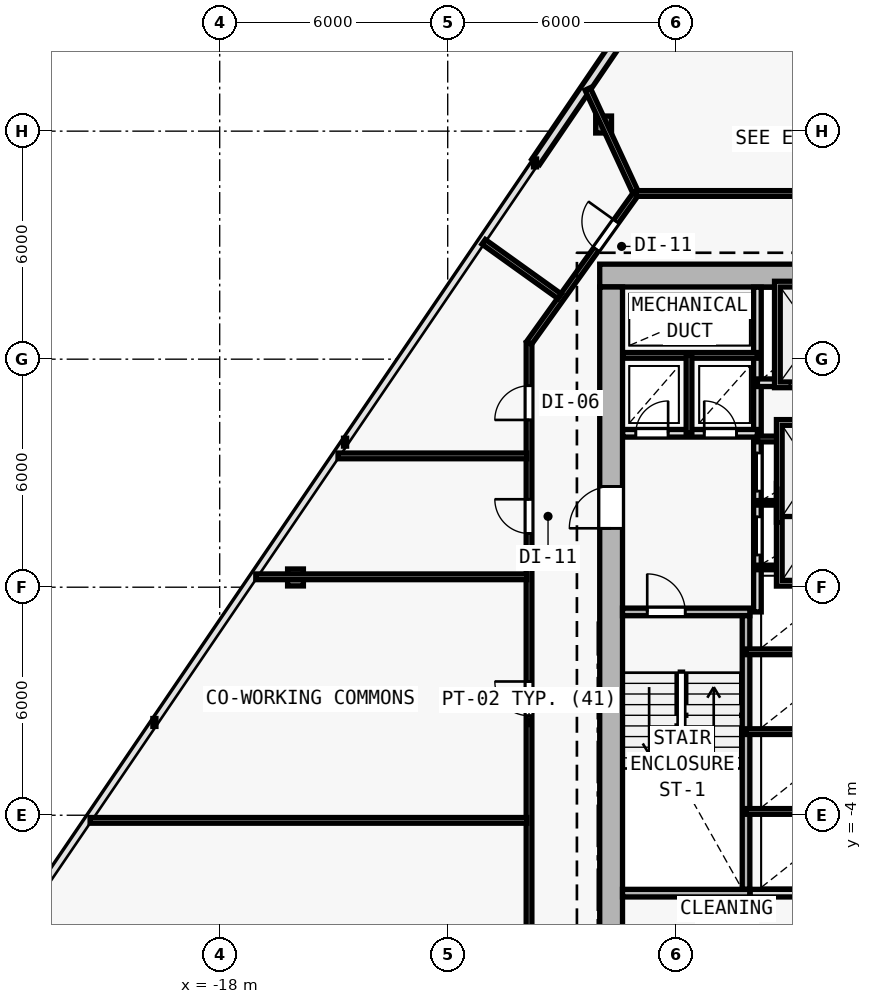
"""IFC4 building model, lengths in metres.
Left out: names, types, materials, properties, quantities, classifications, styles, units other than length and angle.
Written with IfcOpenShell. Run it as: python <this file> out.ifc"""

import sys

from ifc_helpers import new_model, si_unit, direction, frame, frame_2d, origin, origin_2d, place, context, subcontext, project, spatial, rectangle, i_section, extrude, element, fill, save


model = new_model("IFC4")
c1 = context("Model", 3, precision=1e-05, world=origin(), true_north=direction((0.0, 1.0)))
c2 = subcontext(c1, "Body", "Model", "MODEL_VIEW")
j1 = project(units=[si_unit("LENGTHUNIT", "METRE"), si_unit("PLANEANGLEUNIT", "RADIAN")], contexts=[c1])
p1 = place(None, origin())
s1 = spatial("IfcSite", under=j1, at=p1, CompositionType="ELEMENT")
p2 = place(p1, origin())
s2 = spatial("IfcBuilding", under=s1, at=p2, CompositionType="ELEMENT")
p3 = place(p2, frame((0.0, 0.0, 37.2)))
s3 = spatial("IfcBuildingStorey", under=s2, at=p3, CompositionType="ELEMENT", Elevation=37.2)
for number, where, z_axis, x_axis in (
    (1, (-7.7, 10.2, 0.0), (0.0, 0.0, 1.0), (1.0, 0.0, 0.0)),
    (2, (-7.7, 2.0, 0.0), (0.0, 0.0, 1.0), (1.0, 0.0, 0.0)),
):
    element("IfcColumn", number, at=place(p3, frame(where, z_axis=z_axis, x_axis=x_axis)), inside=s3, PredefinedType="COLUMN", context=c2, shape_type="SweptSolid", body=[
        extrude(i_section(OverallWidth=0.416, OverallDepth=0.446, WebThickness=0.025, FlangeThickness=0.04, FilletRadius=0.015, at=origin_2d()), origin(), (0.0, 0.0, 1.0), 3.6),
    ])
p4 = place(p3, frame((-7.898, 14.174, 0.006), z_axis=(0.008775143007, -0.002584925847, 0.999958156636), x_axis=(0.282568886397, 0.959247009086, 0.0)))
e3 = element("IfcColumn", 3, at=p4, inside=s3, PredefinedType="COLUMN", context=c2, shape_type="SweptSolid", body=[
    extrude(i_section(OverallWidth=0.416, OverallDepth=0.446, WebThickness=0.025, FlangeThickness=0.04, FilletRadius=0.015, at=origin_2d()), origin(), (0.0, 0.0, 1.0), 3.589),
])
p5 = place(p3, frame((-16.005, 2.256, 0.006), z_axis=(0.017003572908, 0.009522000828, 0.999810086971), x_axis=(-0.488603368932, 0.87250601595, 0.0)))
e4 = element("IfcColumn", 4, at=p5, inside=s3, PredefinedType="COLUMN", context=c2, shape_type="SweptSolid", body=[
    extrude(i_section(OverallWidth=0.416, OverallDepth=0.446, WebThickness=0.025, FlangeThickness=0.04, FilletRadius=0.015, at=origin_2d()), origin(), (0.0, 0.0, 1.0), 3.59),
])
p6 = place(p3, frame((-9.684, 13.191, 0.0), z_axis=(0.0, 0.0, 1.0), x_axis=(0.562473549685, 0.826815279192, 0.0)))
e5 = element("IfcWall", 5, at=p6, inside=s3, PredefinedType="SOLIDWALL", context=c2, shape_type="SweptSolid", body=[
    extrude(rectangle(XDim=12.536, YDim=0.25, at=frame_2d((6.268, 0.0))), origin(), (0.0, 0.0, 1.0), 3.35),
])
p7 = place(p6, frame((5.668, 0.0, 0.62)))
e6 = element("IfcOpeningElement", 6, at=p7, cuts=e5, PredefinedType="OPENING", context=c2, shape_type="SweptSolid", body=[
    extrude(rectangle(XDim=1.2, YDim=1.8, at=frame_2d((0.6, 0.9))), frame((0.0, 0.135, 0.0), z_axis=(0.0, -1.0, 0.0), x_axis=(1.0, 0.0, 0.0)), (0.0, 0.0, 1.0), 0.27),
])
p8 = place(p3, frame((8.0, 10.2, 0.0), z_axis=(0.0, 0.0, 1.0), x_axis=(-1.0, 0.0, 0.0)))
e7 = element("IfcWall", 7, at=p8, inside=s3, PredefinedType="SHEAR", context=c2, shape_type="SweptSolid", body=[
    extrude(rectangle(XDim=16.0, YDim=0.6, at=frame_2d((8.0, 0.0))), origin(), (0.0, 0.0, 1.0), 3.35),
])
p9 = place(p8, frame((4.45, 0.0, 0.0)))
e8 = element("IfcOpeningElement", 8, at=p9, cuts=e7, PredefinedType="OPENING", context=c2, shape_type="SweptSolid", body=[
    extrude(rectangle(XDim=1.1, YDim=2.15, at=frame_2d((0.55, 1.075))), frame((0.0, 0.31, 0.0), z_axis=(0.0, -1.0, 0.0), x_axis=(1.0, 0.0, 0.0)), (0.0, 0.0, 1.0), 0.62),
])
p10 = place(p3, frame((-7.7, -9.1, 0.0), z_axis=(0.0, 0.0, 1.0), x_axis=(0.0, 1.0, 0.0)))
e9 = element("IfcWall", 9, at=p10, inside=s3, PredefinedType="SHEAR", context=c2, shape_type="SweptSolid", body=[
    extrude(rectangle(XDim=19.0, YDim=0.6, at=frame_2d((9.5, 0.0))), origin(), (0.0, 0.0, 1.0), 3.35),
])
p11 = place(p10, frame((12.65, 0.0, 0.0)))
e10 = element("IfcOpeningElement", 10, at=p11, cuts=e9, PredefinedType="OPENING", context=c2, shape_type="SweptSolid", body=[
    extrude(rectangle(XDim=1.1, YDim=2.15, at=frame_2d((0.55, 1.075))), frame((0.0, 0.31, 0.0), z_axis=(0.0, -1.0, 0.0), x_axis=(1.0, 0.0, 0.0)), (0.0, 0.0, 1.0), 0.62),
])
p12 = place(p3, frame((-7.4, 1.35, 0.0), z_axis=(0.0, 0.0, 1.0), x_axis=(1.0, 0.0, 0.0)))
e11 = element("IfcWall", 11, at=p12, inside=s3, PredefinedType="SOLIDWALL", context=c2, shape_type="SweptSolid", body=[
    extrude(rectangle(XDim=3.35, YDim=0.2, at=frame_2d((1.675, 0.0))), origin(), (0.0, 0.0, 1.0), 3.35),
])
p13 = place(p12, frame((0.65, 0.0, 0.0)))
e12 = element("IfcOpeningElement", 12, at=p13, cuts=e11, PredefinedType="OPENING", context=c2, shape_type="SweptSolid", body=[
    extrude(rectangle(XDim=1.0, YDim=2.15, at=frame_2d((0.5, 1.075))), frame((0.0, 0.11, 0.0), z_axis=(0.0, -1.0, 0.0), x_axis=(1.0, 0.0, 0.0)), (0.0, 0.0, 1.0), 0.22),
])
p14 = place(p3, frame((-4.15, -5.95, 0.0), z_axis=(0.0, 0.0, 1.0), x_axis=(0.0, 1.0, 0.0)))
e13 = element("IfcWall", 13, at=p14, inside=s3, PredefinedType="SOLIDWALL", context=c2, shape_type="SweptSolid", body=[
    extrude(rectangle(XDim=7.2, YDim=0.2, at=frame_2d((3.6, 0.0))), origin(), (0.0, 0.0, 1.0), 3.35),
])
p15 = place(p3, frame((-3.85, 1.35, 0.0), z_axis=(0.0, 0.0, 1.0), x_axis=(0.0, 1.0, 0.0)))
e14 = element("IfcWall", 14, at=p15, inside=s3, PredefinedType="SOLIDWALL", context=c2, shape_type="SweptSolid", body=[
    extrude(rectangle(XDim=8.545, YDim=0.2, at=frame_2d((4.272, 0.0))), origin(), (0.0, 0.0, 1.0), 3.35),
])
p16 = place(p15, frame((1.5, 0.0, 0.0)))
e15 = element("IfcOpeningElement", 15, at=p16, cuts=e14, PredefinedType="OPENING", context=c2, shape_type="SweptSolid", body=[
    extrude(rectangle(XDim=1.0, YDim=2.15, at=frame_2d((0.5, 1.075))), frame((0.0, 0.11, 0.0), z_axis=(0.0, -1.0, 0.0), x_axis=(1.0, 0.0, 0.0)), (0.0, 0.0, 1.0), 0.22),
])
p17 = place(p15, frame((3.18, 0.0, 0.0)))
e16 = element("IfcOpeningElement", 16, at=p17, cuts=e14, PredefinedType="OPENING", context=c2, shape_type="SweptSolid", body=[
    extrude(rectangle(XDim=1.0, YDim=2.15, at=frame_2d((0.5, 1.075))), frame((0.0, 0.11, 0.0), z_axis=(0.0, -1.0, 0.0), x_axis=(1.0, 0.0, 0.0)), (0.0, 0.0, 1.0), 0.22),
])
p18 = place(p3, frame((-7.395, 6.05, 0.0), z_axis=(0.0, 0.0, 1.0), x_axis=(1.0, 0.0, 0.0)))
e17 = element("IfcWall", 17, at=p18, inside=s3, PredefinedType="SOLIDWALL", context=c2, shape_type="SweptSolid", body=[
    extrude(rectangle(XDim=3.545, YDim=0.2, at=frame_2d((1.772, 0.0))), origin(), (0.0, 0.0, 1.0), 3.35),
])
p19 = place(p18, frame((0.345, 0.0, 0.0)))
e18 = element("IfcOpeningElement", 18, at=p19, cuts=e17, PredefinedType="OPENING", context=c2, shape_type="SweptSolid", body=[
    extrude(rectangle(XDim=0.85, YDim=2.1, at=frame_2d((0.425, 1.05))), frame((0.0, 0.11, 0.0), z_axis=(0.0, -1.0, 0.0), x_axis=(1.0, 0.0, 0.0)), (0.0, 0.0, 1.0), 0.22),
])
p20 = place(p18, frame((2.145, 0.0, 0.0)))
e19 = element("IfcOpeningElement", 19, at=p20, cuts=e17, PredefinedType="OPENING", context=c2, shape_type="SweptSolid", body=[
    extrude(rectangle(XDim=0.85, YDim=2.1, at=frame_2d((0.425, 1.05))), frame((0.0, 0.11, 0.0), z_axis=(0.0, -1.0, 0.0), x_axis=(1.0, 0.0, 0.0)), (0.0, 0.0, 1.0), 0.22),
])
p21 = place(p3, frame((-7.395, 8.1, 0.0), z_axis=(0.0, 0.0, 1.0), x_axis=(1.0, 0.0, 0.0)))
e20 = element("IfcWall", 20, at=p21, inside=s3, PredefinedType="PARTITIONING", context=c2, shape_type="SweptSolid", body=[
    extrude(rectangle(XDim=3.545, YDim=0.15, at=frame_2d((1.772, 0.0))), origin(), (0.0, 0.0, 1.0), 3.35),
])
p22 = place(p3, frame((-5.65, 6.05, 0.0), z_axis=(0.0, 0.0, 1.0), x_axis=(0.0, 1.0, 0.0)))
e21 = element("IfcWall", 21, at=p22, inside=s3, PredefinedType="PARTITIONING", context=c2, shape_type="SweptSolid", body=[
    extrude(rectangle(XDim=2.05, YDim=0.15, at=frame_2d((1.025, 0.0))), origin(), (0.0, 0.0, 1.0), 3.35),
])
for number, where, z_axis, x_axis in (
    (22, (-3.85, 2.52, 0.0), (0.0, 0.0, 1.0), (1.0, 0.0, 0.0)),
    (23, (-3.85, 4.22, 0.0), (0.0, 0.0, 1.0), (1.0, 0.0, 0.0)),
):
    element("IfcWall", number, at=place(p3, frame(where, z_axis=z_axis, x_axis=x_axis)), inside=s3, PredefinedType="PARTITIONING", context=c2, shape_type="SweptSolid", body=[
        extrude(rectangle(XDim=2.9, YDim=0.12, at=frame_2d((1.45, 0.0))), origin(), (0.0, 0.0, 1.0), 3.35),
    ])
p23 = place(p3, frame((-3.85, 5.9, 0.0), z_axis=(0.0, 0.0, 1.0), x_axis=(1.0, 0.0, 0.0)))
e24 = element("IfcWall", 24, at=p23, inside=s3, PredefinedType="PARTITIONING", context=c2, shape_type="SweptSolid", body=[
    extrude(rectangle(XDim=2.9, YDim=0.15, at=frame_2d((1.45, 0.0))), origin(), (0.0, 0.0, 1.0), 3.35),
])
p24 = place(p3, frame((-3.85, 7.38, 0.0), z_axis=(0.0, 0.0, 1.0), x_axis=(1.0, 0.0, 0.0)))
e25 = element("IfcWall", 25, at=p24, inside=s3, PredefinedType="SOLIDWALL", context=c2, shape_type="SweptSolid", body=[
    extrude(rectangle(XDim=2.9, YDim=0.2, at=frame_2d((1.45, 0.0))), origin(), (0.0, 0.0, 1.0), 3.35),
])
p25 = place(p24, frame((0.85, 0.0, 0.0)))
e26 = element("IfcOpeningElement", 26, at=p25, cuts=e25, PredefinedType="OPENING", context=c2, shape_type="SweptSolid", body=[
    extrude(rectangle(XDim=1.2, YDim=2.2, at=frame_2d((0.6, 1.1))), frame((0.0, 0.11, 0.0), z_axis=(0.0, -1.0, 0.0), x_axis=(1.0, 0.0, 0.0)), (0.0, 0.0, 1.0), 0.22),
])
for number, where, z_axis, x_axis in (
    (27, (-4.15, -3.9, 0.0), (0.0, 0.0, 1.0), (1.0, 0.0, 0.0)),
    (28, (-4.15, -1.8, 0.0), (0.0, 0.0, 1.0), (1.0, 0.0, 0.0)),
    (29, (-4.15, 0.3, 0.0), (0.0, 0.0, 1.0), (1.0, 0.0, 0.0)),
):
    element("IfcWall", number, at=place(p3, frame(where, z_axis=z_axis, x_axis=x_axis)), inside=s3, PredefinedType="PARTITIONING", context=c2, shape_type="SweptSolid", body=[
        extrude(rectangle(XDim=2.9, YDim=0.15, at=frame_2d((1.45, 0.0))), origin(), (0.0, 0.0, 1.0), 3.35),
    ])
p26 = place(p3, frame((-7.4, -6.05, 0.0), z_axis=(0.0, 0.0, 1.0), x_axis=(1.0, 0.0, 0.0)))
e30 = element("IfcWall", 30, at=p26, inside=s3, PredefinedType="SOLIDWALL", context=c2, shape_type="SweptSolid", body=[
    extrude(rectangle(XDim=3.35, YDim=0.2, at=frame_2d((1.675, 0.0))), origin(), (0.0, 0.0, 1.0), 3.35),
])
p27 = place(p3, frame((-4.04, -6.05, 0.0), z_axis=(0.0, 0.0, 1.0), x_axis=(1.0, 0.0, 0.0)))
e31 = element("IfcWall", 31, at=p27, inside=s3, PredefinedType="SOLIDWALL", context=c2, shape_type="SweptSolid", body=[
    extrude(rectangle(XDim=2.79, YDim=0.2, at=frame_2d((1.395, 0.0))), origin(), (0.0, 0.0, 1.0), 3.35),
])
p28 = place(p3, frame((-9.86, -11.56, 0.0), z_axis=(0.0, 0.0, 1.0), x_axis=(0.0, 1.0, 0.0)))
e32 = element("IfcWall", 32, at=p28, inside=s3, PredefinedType="PARTITIONING", context=c2, shape_type="SweptSolid", body=[
    extrude(rectangle(XDim=19.986, YDim=0.15, at=frame_2d((9.993, 0.0))), origin(), (0.0, 0.0, 1.0), 2.609),
])
p29 = place(p28, frame((10.179, 0.0, 0.0)))
e33 = element("IfcOpeningElement", 33, at=p29, cuts=e32, PredefinedType="OPENING", context=c2, shape_type="SweptSolid", body=[
    extrude(rectangle(XDim=0.9, YDim=2.1, at=frame_2d((0.45, 1.05))), frame((0.0, 0.085, 0.0), z_axis=(0.0, -1.0, 0.0), x_axis=(1.0, 0.0, 0.0)), (0.0, 0.0, 1.0), 0.17),
])
p30 = place(p28, frame((3.352, 0.0, 0.0)))
e34 = element("IfcOpeningElement", 34, at=p30, cuts=e32, PredefinedType="OPENING", context=c2, shape_type="SweptSolid", body=[
    extrude(rectangle(XDim=0.9, YDim=2.1, at=frame_2d((0.45, 1.05))), frame((0.0, 0.085, 0.0), z_axis=(0.0, -1.0, 0.0), x_axis=(1.0, 0.0, 0.0)), (0.0, 0.0, 1.0), 0.17),
])
p31 = place(p28, frame((17.961, 0.0, 0.0)))
e35 = element("IfcOpeningElement", 35, at=p31, cuts=e32, PredefinedType="OPENING", context=c2, shape_type="SweptSolid", body=[
    extrude(rectangle(XDim=0.9, YDim=2.1, at=frame_2d((0.45, 1.05))), frame((0.0, 0.085, 0.0), z_axis=(0.0, -1.0, 0.0), x_axis=(1.0, 0.0, 0.0)), (0.0, 0.0, 1.0), 0.17),
])
p32 = place(p28, frame((14.974, 0.0, 0.0)))
e36 = element("IfcOpeningElement", 36, at=p32, cuts=e32, PredefinedType="OPENING", context=c2, shape_type="SweptSolid", body=[
    extrude(rectangle(XDim=0.9, YDim=2.1, at=frame_2d((0.45, 1.05))), frame((0.0, 0.085, 0.0), z_axis=(0.0, -1.0, 0.0), x_axis=(1.0, 0.0, 0.0)), (0.0, 0.0, 1.0), 0.17),
])
p33 = place(p3, frame((-9.86, 8.426, 0.0), z_axis=(0.0, 0.0, 1.0), x_axis=(0.582449511476, 0.812866881218, 0.0)))
e37 = element("IfcWall", 37, at=p33, inside=s3, PredefinedType="PARTITIONING", context=c2, shape_type="SweptSolid", body=[
    extrude(rectangle(XDim=4.84, YDim=0.15, at=frame_2d((2.42, 0.0))), origin(), (0.0, 0.0, 1.0), 2.725),
])
p34 = place(p33, frame((3.035, 0.0, 0.0)))
e38 = element("IfcOpeningElement", 38, at=p34, cuts=e37, PredefinedType="OPENING", context=c2, shape_type="SweptSolid", body=[
    extrude(rectangle(XDim=0.9, YDim=2.1, at=frame_2d((0.45, 1.05))), frame((0.0, 0.085, 0.0), z_axis=(0.0, -1.0, 0.0), x_axis=(1.0, 0.0, 0.0)), (0.0, 0.0, 1.0), 0.17),
])
p35 = place(p3, frame((-7.041, 12.36, 0.0), z_axis=(0.0, 0.0, 1.0), x_axis=(1.0, 0.0, 0.0)))
e39 = element("IfcWall", 39, at=p35, inside=s3, PredefinedType="PARTITIONING", context=c2, shape_type="SweptSolid", body=[
    extrude(rectangle(XDim=14.082, YDim=0.15, at=frame_2d((7.041, 0.0))), origin(), (0.0, 0.0, 1.0), 3.35),
])
p36 = place(p35, frame((6.591, 0.0, 0.0)))
e40 = element("IfcOpeningElement", 40, at=p36, cuts=e39, PredefinedType="OPENING", context=c2, shape_type="SweptSolid", body=[
    extrude(rectangle(XDim=0.9, YDim=2.1, at=frame_2d((0.45, 1.05))), frame((0.0, 0.085, 0.0), z_axis=(0.0, -1.0, 0.0), x_axis=(1.0, 0.0, 0.0)), (0.0, 0.0, 1.0), 0.17),
])
p37 = place(p3, frame((-7.064, 12.404, 0.0), z_axis=(0.0, 0.0, 1.0), x_axis=(-0.420495526792, 0.90729461144, 0.0)))
e41 = element("IfcWall", 41, at=p37, inside=s3, PredefinedType="PARTITIONING", context=c2, shape_type="SweptSolid", body=[
    extrude(rectangle(XDim=2.983, YDim=0.15, at=frame_2d((1.491, 0.0))), origin(), (0.0, 0.0, 1.0), 2.725),
])
p38 = place(p3, frame((-9.92, 2.273, 0.0), z_axis=(0.0, 0.0, 1.0), x_axis=(-1.0, 0.0, 0.0)))
e42 = element("IfcWall", 42, at=p38, inside=s3, PredefinedType="PARTITIONING", context=c2, shape_type="SweptSolid", body=[
    extrude(rectangle(XDim=7.13, YDim=0.15, at=frame_2d((3.565, 0.0))), origin(), (0.0, 0.0, 1.0), 2.725),
])
p39 = place(p3, frame((-9.054, 9.654, 0.0), z_axis=(0.0, 0.0, 1.0), x_axis=(-0.812868003182, 0.58244794566, 0.0)))
e43 = element("IfcWall", 43, at=p39, inside=s3, PredefinedType="PARTITIONING", context=c2, shape_type="SweptSolid", body=[
    extrude(rectangle(XDim=2.461, YDim=0.15, at=frame_2d((1.231, 0.0))), origin(), (0.0, 0.0, 1.0), 2.725),
])
p40 = place(p3, frame((-9.92, -4.135, 0.0), z_axis=(0.0, 0.0, 1.0), x_axis=(-1.0, 0.0, 0.0)))
e44 = element("IfcWall", 44, at=p40, inside=s3, PredefinedType="PARTITIONING", context=c2, shape_type="SweptSolid", body=[
    extrude(rectangle(XDim=11.49, YDim=0.15, at=frame_2d((5.745, 0.0))), origin(), (0.0, 0.0, 1.0), 2.735),
])
p41 = place(p3, frame((-9.92, 5.455, 0.0), z_axis=(0.0, 0.0, 1.0), x_axis=(-1.0, 0.0, 0.0)))
e45 = element("IfcWall", 45, at=p41, inside=s3, PredefinedType="PARTITIONING", context=c2, shape_type="SweptSolid", body=[
    extrude(rectangle(XDim=4.966, YDim=0.15, at=frame_2d((2.483, 0.0))), origin(), (0.0, 0.0, 1.0), 2.725),
])
p42 = place(p11, origin())
e46 = element("IfcDoor", 46, at=p42, inside=s3, OperationType="SINGLE_SWING_LEFT", PredefinedType="DOOR", context=c2, shape_type="SweptSolid", body=[
    extrude(rectangle(XDim=1.1, YDim=2.15, at=frame_2d((0.55, 1.075))), frame((0.0, 0.025, 0.0), z_axis=(0.0, -1.0, 0.0), x_axis=(1.0, 0.0, 0.0)), (0.0, 0.0, 1.0), 0.05),
])
fill(e10, e46)
p43 = place(p13, origin())
e47 = element("IfcDoor", 47, at=p43, inside=s3, OperationType="SINGLE_SWING_LEFT", PredefinedType="DOOR", context=c2, shape_type="SweptSolid", body=[
    extrude(rectangle(XDim=1.0, YDim=2.15, at=frame_2d((0.5, 1.075))), frame((0.0, 0.025, 0.0), z_axis=(0.0, -1.0, 0.0), x_axis=(1.0, 0.0, 0.0)), (0.0, 0.0, 1.0), 0.05),
])
fill(e12, e47)
p44 = place(p19, origin())
e48 = element("IfcDoor", 48, at=p44, inside=s3, OperationType="SINGLE_SWING_RIGHT", PredefinedType="DOOR", context=c2, shape_type="SweptSolid", body=[
    extrude(rectangle(XDim=0.85, YDim=2.1, at=frame_2d((0.425, 1.05))), frame((0.0, 0.025, 0.0), z_axis=(0.0, -1.0, 0.0), x_axis=(1.0, 0.0, 0.0)), (0.0, 0.0, 1.0), 0.05),
])
fill(e18, e48)
p45 = place(p20, origin())
e49 = element("IfcDoor", 49, at=p45, inside=s3, OperationType="SINGLE_SWING_LEFT", PredefinedType="DOOR", context=c2, shape_type="SweptSolid", body=[
    extrude(rectangle(XDim=0.85, YDim=2.1, at=frame_2d((0.425, 1.05))), frame((0.0, 0.025, 0.0), z_axis=(0.0, -1.0, 0.0), x_axis=(1.0, 0.0, 0.0)), (0.0, 0.0, 1.0), 0.05),
])
fill(e19, e49)
p46 = place(p25, origin())
e50 = element("IfcDoor", 50, at=p46, inside=s3, OperationType="DOUBLE_DOOR_SLIDING", PredefinedType="DOOR", context=c2, shape_type="SweptSolid", body=[
    extrude(rectangle(XDim=1.2, YDim=2.2, at=frame_2d((0.6, 1.1))), frame((0.0, 0.025, 0.0), z_axis=(0.0, -1.0, 0.0), x_axis=(1.0, 0.0, 0.0)), (0.0, 0.0, 1.0), 0.05),
])
fill(e26, e50)
p47 = place(p16, origin())
e51 = element("IfcDoor", 51, at=p47, inside=s3, OperationType="DOUBLE_DOOR_SLIDING", PredefinedType="DOOR", context=c2, shape_type="SweptSolid", body=[
    extrude(rectangle(XDim=1.0, YDim=2.15, at=frame_2d((0.5, 1.075))), frame((0.0, 0.025, 0.0), z_axis=(0.0, -1.0, 0.0), x_axis=(1.0, 0.0, 0.0)), (0.0, 0.0, 1.0), 0.05),
])
fill(e15, e51)
p48 = place(p17, origin())
e52 = element("IfcDoor", 52, at=p48, inside=s3, OperationType="DOUBLE_DOOR_SLIDING", PredefinedType="DOOR", context=c2, shape_type="SweptSolid", body=[
    extrude(rectangle(XDim=1.0, YDim=2.15, at=frame_2d((0.5, 1.075))), frame((0.0, 0.025, 0.0), z_axis=(0.0, -1.0, 0.0), x_axis=(1.0, 0.0, 0.0)), (0.0, 0.0, 1.0), 0.05),
])
fill(e16, e52)
p49 = place(p29, origin())
e53 = element("IfcDoor", 53, at=p49, inside=s3, OperationType="SINGLE_SWING_RIGHT", PredefinedType="DOOR", context=c2, shape_type="SweptSolid", body=[
    extrude(rectangle(XDim=0.9, YDim=2.1, at=frame_2d((0.45, 1.05))), frame((0.0, 0.025, 0.0), z_axis=(0.0, -1.0, 0.0), x_axis=(1.0, 0.0, 0.0)), (0.0, 0.0, 1.0), 0.05),
])
fill(e33, e53)
p50 = place(p34, origin())
e54 = element("IfcDoor", 54, at=p50, inside=s3, OperationType="SINGLE_SWING_RIGHT", PredefinedType="DOOR", context=c2, shape_type="SweptSolid", body=[
    extrude(rectangle(XDim=0.9, YDim=2.1, at=frame_2d((0.45, 1.05))), frame((0.0, 0.025, 0.0), z_axis=(0.0, -1.0, 0.0), x_axis=(1.0, 0.0, 0.0)), (0.0, 0.0, 1.0), 0.05),
])
fill(e38, e54)
p51 = place(p31, origin())
e55 = element("IfcDoor", 55, at=p51, inside=s3, OperationType="SINGLE_SWING_LEFT", PredefinedType="DOOR", context=c2, shape_type="SweptSolid", body=[
    extrude(rectangle(XDim=0.9, YDim=2.1, at=frame_2d((0.45, 1.05))), frame((0.0, 0.025, 0.0), z_axis=(0.0, -1.0, 0.0), x_axis=(1.0, 0.0, 0.0)), (0.0, 0.0, 1.0), 0.05),
])
fill(e35, e55)
p52 = place(p32, origin())
e56 = element("IfcDoor", 56, at=p52, inside=s3, OperationType="SINGLE_SWING_RIGHT", PredefinedType="DOOR", context=c2, shape_type="SweptSolid", body=[
    extrude(rectangle(XDim=0.9, YDim=2.1, at=frame_2d((0.45, 1.05))), frame((0.0, 0.025, 0.0), z_axis=(0.0, -1.0, 0.0), x_axis=(1.0, 0.0, 0.0)), (0.0, 0.0, 1.0), 0.05),
])
fill(e36, e56)
save(model, sys.argv[1])
